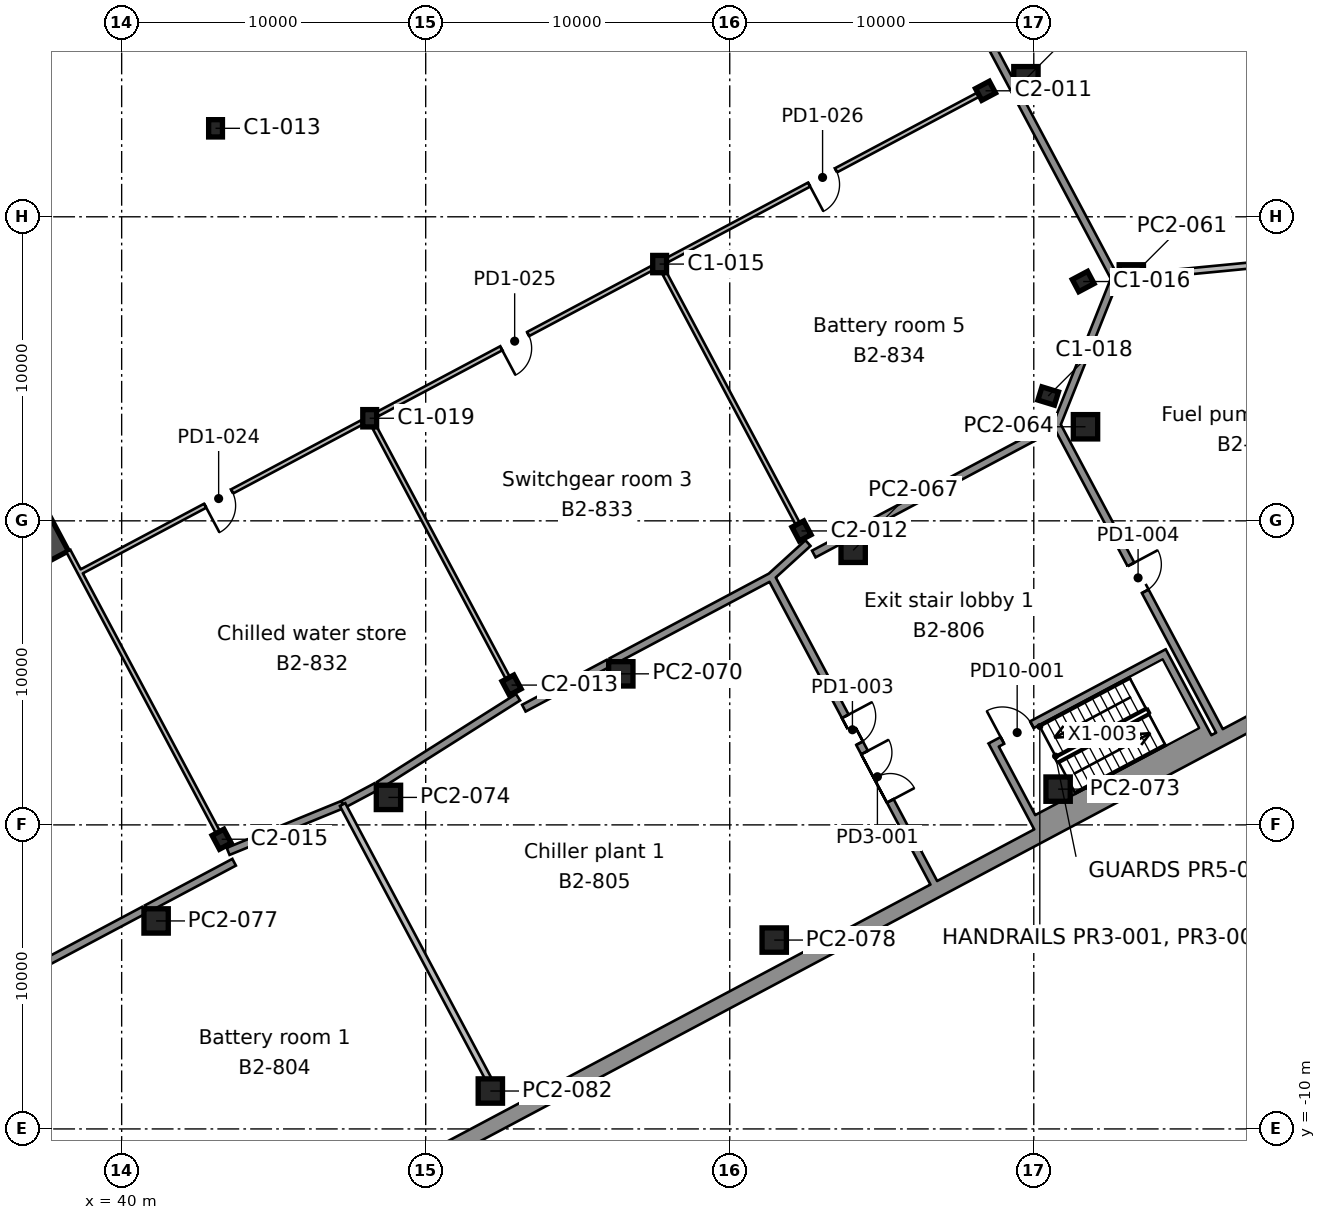
"""IFC4 building model, lengths in metres.
Left out: names, types, materials, properties, quantities, classifications, styles, units other than length and angle.
Written with IfcOpenShell. Run it as: python <this file> out.ifc"""

import sys

from ifc_helpers import new_model, si_unit, direction, frame, frame_2d, origin, origin_2d, place, context, subcontext, project, spatial, rectangle, i_section, extrude, element, fill, save


model = new_model("IFC4")
c1 = context("Model", 3, precision=1e-05, world=origin(), true_north=direction((0.0, 1.0)))
c2 = subcontext(c1, "Body", "Model", "MODEL_VIEW")
j1 = project(units=[si_unit("LENGTHUNIT", "METRE"), si_unit("PLANEANGLEUNIT", "RADIAN")], contexts=[c1])
p1 = place(None, origin())
s1 = spatial("IfcSite", under=j1, at=p1, CompositionType="ELEMENT")
p2 = place(p1, origin())
s2 = spatial("IfcBuilding", under=s1, at=p2, CompositionType="ELEMENT")
p3 = place(p2, frame((0.0, 0.0, -9.0)))
s3 = spatial("IfcBuildingStorey", under=s2, at=p3, CompositionType="ELEMENT", Elevation=-9.0)
for number, where, z_axis, x_axis in (
    (1, (43.289, -0.472, 0.0), (0.0, 0.0, 1.0), (0.883, 0.469, 0.0)),
    (2, (52.825, 4.598, 0.0), (0.0, 0.0, 1.0), (0.883, 0.469, 0.0)),
    (3, (62.361, 9.668, 0.0), (0.0, 0.0, 1.0), (0.883, 0.469, 0.0)),
):
    element("IfcColumn", number, at=place(p3, frame(where, z_axis=z_axis, x_axis=x_axis)), inside=s3, PredefinedType="COLUMN", context=c2, shape_type="SweptSolid", body=[
        extrude(i_section(OverallWidth=0.437, OverallDepth=0.513, WebThickness=0.061, FlangeThickness=0.097, FilletRadius=0.015, at=origin_2d()), origin(), (0.0, 0.0, 1.0), 4.5),
    ])
for number, where, z_axis, x_axis in (
    (4, (48.158, 13.374, 0.0), (0.0, 0.0, 1.0), (1.0, 0.0, 0.0)),
    (5, (70.474, 14.106, 0.0), (0.0, 0.0, 1.0), (0.292, 0.956, 0.0)),
    (6, (71.625, 17.871, 0.0), (0.0, 0.0, 1.0), (-0.469, 0.883, 0.0)),
    (7, (57.694, 18.445, 0.0), (0.0, 0.0, 1.0), (1.0, 0.0, 0.0)),
    (8, (43.088, 22.91, 0.0), (0.0, 0.0, 1.0), (1.0, 0.0, 0.0)),
):
    element("IfcColumn", number, at=place(p3, frame(where, z_axis=z_axis, x_axis=x_axis)), inside=s3, PredefinedType="COLUMN", context=c2, shape_type="SweptSolid", body=[
        extrude(i_section(OverallWidth=0.455, OverallDepth=0.569, WebThickness=0.078, FlangeThickness=0.125, FilletRadius=0.015, at=origin_2d()), origin(), (0.0, 0.0, 1.0), 4.5),
    ])
p4 = place(p3, frame((68.413, 24.144, 0.0), z_axis=(0.0, 0.0, 1.0), x_axis=(-0.469471562786, 0.882947592859, 0.0)))
e9 = element("IfcColumn", 9, at=p4, inside=s3, PredefinedType="COLUMN", context=c2, shape_type="SweptSolid", body=[
    extrude(i_section(OverallWidth=0.437, OverallDepth=0.513, WebThickness=0.061, FlangeThickness=0.097, FilletRadius=0.015, at=origin_2d()), origin(), (0.0, 0.0, 1.0), 4.5),
])
p5 = place(p3, frame((37.849, 8.799, 0.0), z_axis=(0.0, 0.0, 1.0), x_axis=(-0.469465789982, 0.882950662289, 0.0)))
e10 = element("IfcWall", 10, at=p5, inside=s3, PredefinedType="SHEAR", context=c2, shape_type="SweptSolid", body=[
    extrude(rectangle(XDim=20.0, YDim=0.9, at=frame_2d((10.0, 0.0))), origin(), (0.0, 0.0, 1.0), 4.5),
])
p6 = place(p5, frame((10.6, 0.0, 0.0)))
e11 = element("IfcOpeningElement", 11, at=p6, cuts=e10, PredefinedType="OPENING", context=c2, shape_type="SweptSolid", body=[
    extrude(rectangle(XDim=2.4, YDim=2.4, at=frame_2d((1.2, 1.2))), frame((0.0, 0.46, 0.0), z_axis=(0.0, -1.0, 0.0), x_axis=(1.0, 0.0, 0.0)), (0.0, 0.0, 1.0), 0.92),
])
p7 = place(p3, frame((5.703, -34.625, 0.0), z_axis=(0.0, 0.0, 1.0), x_axis=(0.882947521781, 0.469471696464, 0.0)))
e12 = element("IfcWall", 12, at=p7, inside=s3, PredefinedType="SOLIDWALL", context=c2, shape_type="SweptSolid", body=[
    extrude(rectangle(XDim=85.294, YDim=0.5, at=frame_2d((42.647, 0.0))), origin(), (0.0, 0.0, 1.0), 4.5),
])
p8 = place(p3, frame((85.221, 19.18, 0.0), z_axis=(0.0, 0.0, 1.0), x_axis=(-0.469470569953, 0.882948120757, 0.0)))
e13 = element("IfcWall", 13, at=p8, inside=s3, PredefinedType="SOLIDWALL", context=c2, shape_type="SweptSolid", body=[
    extrude(rectangle(XDim=46.148, YDim=0.5, at=frame_2d((23.074, 0.0))), origin(), (0.0, 0.0, 1.0), 4.5),
])
for number, where, z_axis, x_axis in (
    (14, (52.126, -8.753, 0.0), (0.0, 0.0, 1.0), (1.0, 0.0, 0.0)),
    (15, (61.463, -3.788, 0.0), (0.0, 0.0, 1.0), (1.0, 0.0, 0.0)),
    (16, (41.133, -3.159, 0.0), (0.0, 0.0, 1.0), (1.0, 0.0, 0.0)),
    (17, (48.775, 0.904, 0.0), (0.0, 0.0, 1.0), (1.0, 0.0, 0.0)),
    (18, (70.8, 1.176, 0.0), (0.0, 0.0, 1.0), (1.0, 0.0, 0.0)),
    (19, (56.417, 4.968, 0.0), (0.0, 0.0, 1.0), (1.0, 0.0, 0.0)),
    (20, (64.059, 9.031, 0.0), (0.0, 0.0, 1.0), (1.0, 0.0, 0.0)),
    (21, (71.701, 13.094, 0.0), (0.0, 0.0, 1.0), (1.0, 0.0, 0.0)),
    (22, (73.208, 18.023, 0.0), (0.0, 0.0, 1.0), (1.0, 0.0, 0.0)),
    (23, (69.742, 24.541, 0.0), (0.0, 0.0, 1.0), (1.0, 0.0, 0.0)),
):
    element("IfcColumn", number, at=place(p3, frame(where, z_axis=z_axis, x_axis=x_axis)), inside=s3, PredefinedType="COLUMN", context=c2, shape_type="SweptSolid", body=[
        extrude(rectangle(XDim=0.8, YDim=0.8, at=origin_2d()), origin(), (0.0, 0.0, 1.0), 4.1),
    ])
p9 = place(p3, frame((52.063, -8.353, 0.0), z_axis=(0.0, 0.0, 1.0), x_axis=(-0.469467926311, 0.882949526397, 0.0)))
e24 = element("IfcWall", 24, at=p9, inside=s3, PredefinedType="PARTITIONING", context=c2, shape_type="SweptSolid", body=[
    extrude(rectangle(XDim=10.217, YDim=0.2, at=frame_2d((5.109, 0.0))), origin(), (0.0, 0.0, 1.0), 4.1),
])
p10 = place(p3, frame((47.27, 0.67, 0.0), z_axis=(0.0, 0.0, 1.0), x_axis=(-0.925490593681, -0.378770591531, 0.0)))
e25 = element("IfcWall", 25, at=p10, inside=s3, PredefinedType="SOLIDWALL", context=c2, shape_type="SweptSolid", body=[
    extrude(rectangle(XDim=4.072, YDim=0.25, at=frame_2d((2.036, 0.0))), origin(), (0.0, 0.0, 1.0), 4.1),
])
p11 = place(p3, frame((43.699, -1.229, 0.0), z_axis=(0.0, 0.0, 1.0), x_axis=(-0.882959571528, -0.469449033492, 0.0)))
e26 = element("IfcWall", 26, at=p11, inside=s3, PredefinedType="SOLIDWALL", context=c2, shape_type="SweptSolid", body=[
    extrude(rectangle(XDim=3.26, YDim=0.25, at=frame_2d((1.63, 0.0))), origin(), (0.0, 0.0, 1.0), 4.1),
])
p12 = place(p3, frame((40.733, -2.805, 0.0), z_axis=(0.0, 0.0, 1.0), x_axis=(-0.882943115894, -0.469479982635, 0.0)))
e27 = element("IfcWall", 27, at=p12, inside=s3, PredefinedType="SOLIDWALL", context=c2, shape_type="SweptSolid", body=[
    extrude(rectangle(XDim=8.555, YDim=0.25, at=frame_2d((4.278, 0.0))), origin(), (0.0, 0.0, 1.0), 4.1),
])
p13 = place(p3, frame((66.711, -1.904, 0.0), z_axis=(0.0, 0.0, 1.0), x_axis=(-0.469474097874, 0.882946244924, 0.0)))
e28 = element("IfcWall", 28, at=p13, inside=s3, PredefinedType="SOLIDWALL", context=c2, shape_type="SweptSolid", body=[
    extrude(rectangle(XDim=11.4, YDim=0.25, at=frame_2d((5.7, 0.0))), origin(), (0.0, 0.0, 1.0), 4.1),
])
p14 = place(p13, frame((5.2, 0.0, 0.0)))
e29 = element("IfcOpeningElement", 29, at=p14, cuts=e28, PredefinedType="OPENING", context=c2, shape_type="SweptSolid", body=[
    extrude(rectangle(XDim=1.0, YDim=2.1, at=frame_2d((0.5, 1.05))), frame((0.0, 0.135, 0.0), z_axis=(0.0, -1.0, 0.0), x_axis=(1.0, 0.0, 0.0)), (0.0, 0.0, 1.0), 0.27),
])
p15 = place(p13, frame((3.05, 0.0, 0.0)))
e30 = element("IfcOpeningElement", 30, at=p15, cuts=e28, PredefinedType="OPENING", context=c2, shape_type="SweptSolid", body=[
    extrude(rectangle(XDim=1.8, YDim=2.1, at=frame_2d((0.9, 1.05))), frame((0.0, 0.135, 0.0), z_axis=(0.0, -1.0, 0.0), x_axis=(1.0, 0.0, 0.0)), (0.0, 0.0, 1.0), 0.27),
])
p16 = place(p3, frame((53.037, 4.198, 0.0), z_axis=(0.0, 0.0, 1.0), x_axis=(-0.845143693755, -0.534539181825, 0.0)))
e31 = element("IfcWall", 31, at=p16, inside=s3, PredefinedType="SOLIDWALL", context=c2, shape_type="SweptSolid", body=[
    extrude(rectangle(XDim=5.414, YDim=0.25, at=frame_2d((2.707, 0.0))), origin(), (0.0, 0.0, 1.0), 4.1),
])
p17 = place(p3, frame((48.375, 1.258, 0.0), z_axis=(0.0, 0.0, 1.0), x_axis=(-0.883006084416, -0.469361539631, 0.0)))
e32 = element("IfcWall", 32, at=p17, inside=s3, PredefinedType="SOLIDWALL", context=c2, shape_type="SweptSolid", body=[
    extrude(rectangle(XDim=1.24, YDim=0.25, at=frame_2d((0.62, 0.0))), origin(), (0.0, 0.0, 1.0), 4.1),
])
p18 = place(p3, frame((61.363, 8.164, 0.0), z_axis=(0.0, 0.0, 1.0), x_axis=(-0.882945796858, -0.469474940556, 0.0)))
e33 = element("IfcWall", 33, at=p18, inside=s3, PredefinedType="SOLIDWALL", context=c2, shape_type="SweptSolid", body=[
    extrude(rectangle(XDim=5.955, YDim=0.25, at=frame_2d((2.978, 0.0))), origin(), (0.0, 0.0, 1.0), 4.1),
])
p19 = place(p3, frame((56.017, 5.321, 0.0), z_axis=(0.0, 0.0, 1.0), x_axis=(-0.882921481106, -0.469520668555, 0.0)))
e34 = element("IfcWall", 34, at=p19, inside=s3, PredefinedType="SOLIDWALL", context=c2, shape_type="SweptSolid", body=[
    extrude(rectangle(XDim=3.158, YDim=0.25, at=frame_2d((1.579, 0.0))), origin(), (0.0, 0.0, 1.0), 4.1),
])
p20 = place(p3, frame((76.107, 3.092, 0.0), z_axis=(0.0, 0.0, 1.0), x_axis=(-0.469474097874, 0.882946244924, 0.0)))
e35 = element("IfcWall", 35, at=p20, inside=s3, PredefinedType="SOLIDWALL", context=c2, shape_type="SweptSolid", body=[
    extrude(rectangle(XDim=11.4, YDim=0.25, at=frame_2d((5.7, 0.0))), origin(), (0.0, 0.0, 1.0), 4.1),
])
p21 = place(p20, frame((5.2, 0.0, 0.0)))
e36 = element("IfcOpeningElement", 36, at=p21, cuts=e35, PredefinedType="OPENING", context=c2, shape_type="SweptSolid", body=[
    extrude(rectangle(XDim=1.0, YDim=2.1, at=frame_2d((0.5, 1.05))), frame((0.0, 0.135, 0.0), z_axis=(0.0, -1.0, 0.0), x_axis=(1.0, 0.0, 0.0)), (0.0, 0.0, 1.0), 0.27),
])
p22 = place(p3, frame((62.573, 9.268, 0.0), z_axis=(0.0, 0.0, 1.0), x_axis=(-0.739544046234, -0.673108166404, 0.0)))
e37 = element("IfcWall", 37, at=p22, inside=s3, PredefinedType="SOLIDWALL", context=c2, shape_type="SweptSolid", body=[
    extrude(rectangle(XDim=1.646, YDim=0.25, at=frame_2d((0.823, 0.0))), origin(), (0.0, 0.0, 1.0), 4.1),
])
p23 = place(p3, frame((70.758, 13.159, 0.0), z_axis=(0.0, 0.0, 1.0), x_axis=(-0.882950480299, -0.46946613226, 0.0)))
e38 = element("IfcWall", 38, at=p23, inside=s3, PredefinedType="SOLIDWALL", context=c2, shape_type="SweptSolid", body=[
    extrude(rectangle(XDim=7.941, YDim=0.25, at=frame_2d((3.971, 0.0))), origin(), (0.0, 0.0, 1.0), 4.1),
])
p24 = place(p3, frame((63.659, 9.385, 0.0), z_axis=(0.0, 0.0, 1.0), x_axis=(-0.882866012348, -0.469624961263, 0.0)))
e39 = element("IfcWall", 39, at=p24, inside=s3, PredefinedType="SOLIDWALL", context=c2, shape_type="SweptSolid", body=[
    extrude(rectangle(XDim=1.013, YDim=0.25, at=frame_2d((0.507, 0.0))), origin(), (0.0, 0.0, 1.0), 4.1),
])
p25 = place(p3, frame((83.69, 19.032, 0.0), z_axis=(0.0, 0.0, 1.0), x_axis=(-0.995397009029, -0.095837333105, 0.0)))
e40 = element("IfcWall", 40, at=p25, inside=s3, PredefinedType="PARTITIONING", context=c2, shape_type="SweptSolid", body=[
    extrude(rectangle(XDim=10.129, YDim=0.2, at=frame_2d((5.064, 0.0))), origin(), (0.0, 0.0, 1.0), 4.1),
])
p26 = place(p3, frame((72.669, 17.971, 0.0), z_axis=(0.0, 0.0, 1.0), x_axis=(-0.370009777786, -0.929027859831, 0.0)))
e41 = element("IfcWall", 41, at=p26, inside=s3, PredefinedType="SOLIDWALL", context=c2, shape_type="SweptSolid", body=[
    extrude(rectangle(XDim=5.184, YDim=0.25, at=frame_2d((2.592, 0.0))), origin(), (0.0, 0.0, 1.0), 4.1),
])
p27 = place(p3, frame((65.923, 30.659, 0.0), z_axis=(0.0, 0.0, 1.0), x_axis=(0.469479540895, -0.882943350777, 0.0)))
e42 = element("IfcWall", 42, at=p27, inside=s3, PredefinedType="SOLIDWALL", context=c2, shape_type="SweptSolid", body=[
    extrude(rectangle(XDim=7.283, YDim=0.25, at=frame_2d((3.642, 0.0))), origin(), (0.0, 0.0, 1.0), 4.1),
])
p28 = place(p27, frame((3.141, 0.0, 0.0)))
e43 = element("IfcOpeningElement", 43, at=p28, cuts=e42, PredefinedType="OPENING", context=c2, shape_type="SweptSolid", body=[
    extrude(rectangle(XDim=1.0, YDim=2.1, at=frame_2d((0.5, 1.05))), frame((0.0, 0.135, 0.0), z_axis=(0.0, -1.0, 0.0), x_axis=(1.0, 0.0, 0.0)), (0.0, 0.0, 1.0), 0.27),
])
p29 = place(p3, frame((69.389, 24.141, 0.0), z_axis=(0.0, 0.0, 1.0), x_axis=(0.469461736628, -0.882952817449, 0.0)))
e44 = element("IfcWall", 44, at=p29, inside=s3, PredefinedType="SOLIDWALL", context=c2, shape_type="SweptSolid", body=[
    extrude(rectangle(XDim=6.988, YDim=0.25, at=frame_2d((3.494, 0.0))), origin(), (0.0, 0.0, 1.0), 4.1),
])
p30 = place(p3, frame((38.622, 8.304, 0.0), z_axis=(0.0, 0.0, 1.0), x_axis=(0.882956451437, 0.469454901845, 0.0)))
e45 = element("IfcWall", 45, at=p30, inside=s3, PredefinedType="PARTITIONING", context=c2, shape_type="SweptSolid", body=[
    extrude(rectangle(XDim=10.502, YDim=0.15, at=frame_2d((5.251, 0.0))), origin(), (0.0, 0.0, 1.0), 4.1),
])
p31 = place(p30, frame((4.673, 0.0, 0.0)))
e46 = element("IfcOpeningElement", 46, at=p31, cuts=e45, PredefinedType="OPENING", context=c2, shape_type="SweptSolid", body=[
    extrude(rectangle(XDim=1.0, YDim=2.1, at=frame_2d((0.5, 1.05))), frame((0.0, 0.085, 0.0), z_axis=(0.0, -1.0, 0.0), x_axis=(1.0, 0.0, 0.0)), (0.0, 0.0, 1.0), 0.17),
])
p32 = place(p3, frame((48.421, 13.514, 0.0), z_axis=(0.0, 0.0, 1.0), x_axis=(0.882940965658, 0.469484026526, 0.0)))
e47 = element("IfcWall", 47, at=p32, inside=s3, PredefinedType="PARTITIONING", context=c2, shape_type="SweptSolid", body=[
    extrude(rectangle(XDim=10.205, YDim=0.15, at=frame_2d((5.103, 0.0))), origin(), (0.0, 0.0, 1.0), 4.1),
])
p33 = place(p32, frame((4.603, 0.0, 0.0)))
e48 = element("IfcOpeningElement", 48, at=p33, cuts=e47, PredefinedType="OPENING", context=c2, shape_type="SweptSolid", body=[
    extrude(rectangle(XDim=1.0, YDim=2.1, at=frame_2d((0.5, 1.05))), frame((0.0, 0.085, 0.0), z_axis=(0.0, -1.0, 0.0), x_axis=(1.0, 0.0, 0.0)), (0.0, 0.0, 1.0), 0.17),
])
p34 = place(p3, frame((57.957, 18.584, 0.0), z_axis=(0.0, 0.0, 1.0), x_axis=(0.882944872937, 0.469476678179, 0.0)))
e49 = element("IfcWall", 49, at=p34, inside=s3, PredefinedType="PARTITIONING", context=c2, shape_type="SweptSolid", body=[
    extrude(rectangle(XDim=11.586, YDim=0.15, at=frame_2d((5.793, 0.0))), origin(), (0.0, 0.0, 1.0), 4.1),
])
p35 = place(p34, frame((5.273, 0.0, 0.0)))
e50 = element("IfcOpeningElement", 50, at=p35, cuts=e49, PredefinedType="OPENING", context=c2, shape_type="SweptSolid", body=[
    extrude(rectangle(XDim=1.0, YDim=2.1, at=frame_2d((0.5, 1.05))), frame((0.0, 0.085, 0.0), z_axis=(0.0, -1.0, 0.0), x_axis=(1.0, 0.0, 0.0)), (0.0, 0.0, 1.0), 0.17),
])
p36 = place(p3, frame((38.247, 9.01, 0.0), z_axis=(0.0, 0.0, 1.0), x_axis=(0.469454908155, -0.882956448082, 0.0)))
e51 = element("IfcWall", 51, at=p36, inside=s3, PredefinedType="PARTITIONING", context=c2, shape_type="SweptSolid", body=[
    extrude(rectangle(XDim=0.794, YDim=0.15, at=frame_2d((0.397, 0.0))), origin(), (0.0, 0.0, 1.0), 4.1),
])
p37 = place(p3, frame((52.704, 4.824, 0.0), z_axis=(0.0, 0.0, 1.0), x_axis=(-0.469494001944, 0.882935661381, 0.0)))
e52 = element("IfcWall", 52, at=p37, inside=s3, PredefinedType="PARTITIONING", context=c2, shape_type="SweptSolid", body=[
    extrude(rectangle(XDim=9.325, YDim=0.15, at=frame_2d((4.663, 0.0))), origin(), (0.0, 0.0, 1.0), 4.1),
])
p38 = place(p3, frame((38.62, 8.308, 0.0), z_axis=(0.0, 0.0, 1.0), x_axis=(0.469473365889, -0.882946634129, 0.0)))
e53 = element("IfcWall", 53, at=p38, inside=s3, PredefinedType="PARTITIONING", context=c2, shape_type="SweptSolid", body=[
    extrude(rectangle(XDim=9.687, YDim=0.15, at=frame_2d((4.844, 0.0))), origin(), (0.0, 0.0, 1.0), 4.1),
])
p39 = place(p3, frame((62.24, 9.894, 0.0), z_axis=(0.0, 0.0, 1.0), x_axis=(-0.469471003187, 0.882947890403, 0.0)))
e54 = element("IfcWall", 54, at=p39, inside=s3, PredefinedType="PARTITIONING", context=c2, shape_type="SweptSolid", body=[
    extrude(rectangle(XDim=9.326, YDim=0.15, at=frame_2d((4.663, 0.0))), origin(), (0.0, 0.0, 1.0), 4.1),
])
p40 = place(p3, frame((69.937, 0.264, 0.0), z_axis=(0.0, 0.0, 1.0), x_axis=(-0.469533439143, 0.882914689835, 0.0)))
e55 = element("IfcWall", 55, at=p40, inside=s3, PredefinedType="SOLIDWALL", context=c2, shape_type="SweptSolid", body=[
    extrude(rectangle(XDim=2.8, YDim=0.25, at=frame_2d((1.4, 0.0))), origin(), (0.0, 0.0, 1.0), 4.1),
])
p41 = place(p3, frame((75.544, 3.245, 0.0), z_axis=(0.0, 0.0, 1.0), x_axis=(-0.469497295046, 0.882933910293, 0.0)))
e56 = element("IfcWall", 56, at=p41, inside=s3, PredefinedType="SOLIDWALL", context=c2, shape_type="SweptSolid", body=[
    extrude(rectangle(XDim=2.8, YDim=0.25, at=frame_2d((1.4, 0.0))), origin(), (0.0, 0.0, 1.0), 4.1),
])
p42 = place(p3, frame((68.571, 2.567, 0.0), z_axis=(0.0, 0.0, 1.0), x_axis=(0.882937969766, 0.469489660743, 0.0)))
e57 = element("IfcWall", 57, at=p42, inside=s3, PredefinedType="SOLIDWALL", context=c2, shape_type="SweptSolid", body=[
    extrude(rectangle(XDim=6.6, YDim=0.25, at=frame_2d((3.3, 0.0))), origin(), (0.0, 0.0, 1.0), 4.1),
])
p43 = place(p42, frame((0.45, 0.0, 0.0)))
e58 = element("IfcOpeningElement", 58, at=p43, cuts=e57, PredefinedType="OPENING", context=c2, shape_type="SweptSolid", body=[
    extrude(rectangle(XDim=1.1, YDim=2.1, at=frame_2d((0.55, 1.05))), frame((0.0, 0.135, 0.0), z_axis=(0.0, -1.0, 0.0), x_axis=(1.0, 0.0, 0.0)), (0.0, 0.0, 1.0), 0.27),
])
p44 = place(p3, frame((69.92, 0.029, 0.0), z_axis=(0.0, 0.0, 1.0), x_axis=(0.882953303447, 0.469460822575, 0.0)))
e59 = element("IfcWall", 59, at=p44, inside=s3, PredefinedType="SOLIDWALL", context=c2, shape_type="SweptSolid", body=[
    extrude(rectangle(XDim=6.6, YDim=0.4, at=frame_2d((3.3, 0.0))), origin(), (0.0, 0.0, 1.0), 4.1),
])
p45 = place(p43, origin())
e60 = element("IfcDoor", 60, at=p45, inside=s3, OperationType="SINGLE_SWING_LEFT", PredefinedType="DOOR", context=c2, shape_type="SweptSolid", body=[
    extrude(rectangle(XDim=1.1, YDim=2.1, at=frame_2d((0.55, 1.05))), frame((0.0, 0.025, 0.0), z_axis=(0.0, -1.0, 0.0), x_axis=(1.0, 0.0, 0.0)), (0.0, 0.0, 1.0), 0.05),
])
fill(e58, e60)
p46 = place(p35, frame((1.0, 0.0, 0.0), z_axis=(0.0, 0.0, 1.0), x_axis=(-1.0, 0.0, 0.0)))
e61 = element("IfcDoor", 61, at=p46, inside=s3, OperationType="SINGLE_SWING_RIGHT", PredefinedType="DOOR", context=c2, shape_type="SweptSolid", body=[
    extrude(rectangle(XDim=1.0, YDim=2.1, at=frame_2d((0.5, 1.05))), frame((0.0, 0.025, 0.0), z_axis=(0.0, -1.0, 0.0), x_axis=(1.0, 0.0, 0.0)), (0.0, 0.0, 1.0), 0.05),
])
fill(e50, e61)
p47 = place(p31, frame((1.0, 0.0, 0.0), z_axis=(0.0, 0.0, 1.0), x_axis=(-1.0, 0.0, 0.0)))
e62 = element("IfcDoor", 62, at=p47, inside=s3, OperationType="SINGLE_SWING_RIGHT", PredefinedType="DOOR", context=c2, shape_type="SweptSolid", body=[
    extrude(rectangle(XDim=1.0, YDim=2.1, at=frame_2d((0.5, 1.05))), frame((0.0, 0.025, 0.0), z_axis=(0.0, -1.0, 0.0), x_axis=(1.0, 0.0, 0.0)), (0.0, 0.0, 1.0), 0.05),
])
fill(e46, e62)
p48 = place(p33, frame((1.0, 0.0, 0.0), z_axis=(0.0, 0.0, 1.0), x_axis=(-1.0, 0.0, 0.0)))
e63 = element("IfcDoor", 63, at=p48, inside=s3, OperationType="SINGLE_SWING_RIGHT", PredefinedType="DOOR", context=c2, shape_type="SweptSolid", body=[
    extrude(rectangle(XDim=1.0, YDim=2.1, at=frame_2d((0.5, 1.05))), frame((0.0, 0.025, 0.0), z_axis=(0.0, -1.0, 0.0), x_axis=(1.0, 0.0, 0.0)), (0.0, 0.0, 1.0), 0.05),
])
fill(e48, e63)
p49 = place(p14, frame((1.0, 0.0, 0.0), z_axis=(0.0, 0.0, 1.0), x_axis=(-1.0, 0.0, 0.0)))
e64 = element("IfcDoor", 64, at=p49, inside=s3, OperationType="SINGLE_SWING_LEFT", PredefinedType="DOOR", context=c2, shape_type="SweptSolid", body=[
    extrude(rectangle(XDim=1.0, YDim=2.1, at=frame_2d((0.5, 1.05))), frame((0.0, 0.025, 0.0), z_axis=(0.0, -1.0, 0.0), x_axis=(1.0, 0.0, 0.0)), (0.0, 0.0, 1.0), 0.05),
])
fill(e29, e64)
p50 = place(p21, frame((1.0, 0.0, 0.0), z_axis=(0.0, 0.0, 1.0), x_axis=(-1.0, 0.0, 0.0)))
e65 = element("IfcDoor", 65, at=p50, inside=s3, OperationType="SINGLE_SWING_LEFT", PredefinedType="DOOR", context=c2, shape_type="SweptSolid", body=[
    extrude(rectangle(XDim=1.0, YDim=2.1, at=frame_2d((0.5, 1.05))), frame((0.0, 0.025, 0.0), z_axis=(0.0, -1.0, 0.0), x_axis=(1.0, 0.0, 0.0)), (0.0, 0.0, 1.0), 0.05),
])
fill(e36, e65)
p51 = place(p15, frame((1.8, 0.0, 0.0), z_axis=(0.0, 0.0, 1.0), x_axis=(-1.0, 0.0, 0.0)))
e66 = element("IfcDoor", 66, at=p51, inside=s3, OperationType="DOUBLE_DOOR_SINGLE_SWING", PredefinedType="DOOR", context=c2, shape_type="SweptSolid", body=[
    extrude(rectangle(XDim=1.8, YDim=2.1, at=frame_2d((0.9, 1.05))), frame((0.0, 0.025, 0.0), z_axis=(0.0, -1.0, 0.0), x_axis=(1.0, 0.0, 0.0)), (0.0, 0.0, 1.0), 0.05),
])
fill(e30, e66)
save(model, sys.argv[1])
